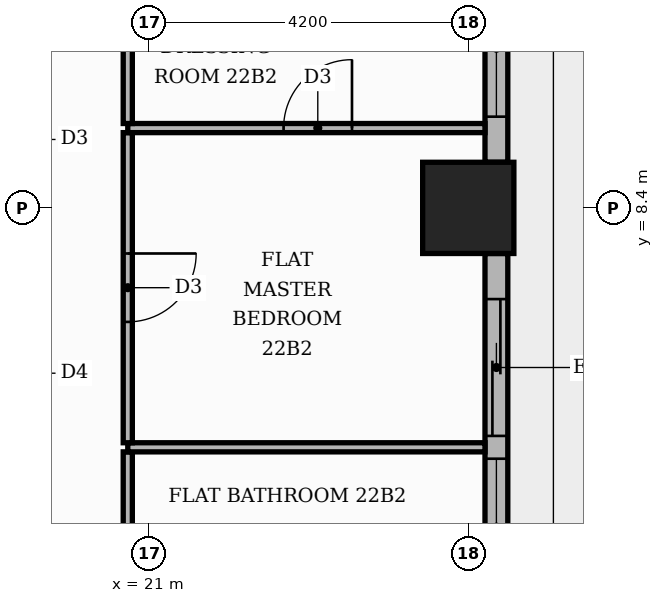
"""IFC4 building model, lengths in metres.
Left out: names, types, materials, properties, quantities, classifications, styles, units other than length and angle.
Written with IfcOpenShell. Run it as: python <this file> out.ifc"""

import sys

from ifc_helpers import new_model, si_unit, direction, frame, frame_2d, origin, origin_2d, place, context, subcontext, project, spatial, rectangle, extrude, element, fill, save


model = new_model("IFC4")
c1 = context("Model", 3, precision=1e-05, world=origin(), true_north=direction((0.0, 1.0)))
c2 = subcontext(c1, "Body", "Model", "MODEL_VIEW")
j1 = project(units=[si_unit("LENGTHUNIT", "METRE"), si_unit("PLANEANGLEUNIT", "RADIAN")], contexts=[c1])
p1 = place(None, origin())
s1 = spatial("IfcSite", under=j1, at=p1, CompositionType="ELEMENT")
p2 = place(p1, origin())
s2 = spatial("IfcBuilding", under=s1, at=p2, CompositionType="ELEMENT")
p3 = place(p2, frame((0.0, 0.0, 94.8)))
s3 = spatial("IfcBuildingStorey", under=s2, at=p3, CompositionType="ELEMENT", Elevation=94.8)
p4 = place(p3, frame((25.2, 8.4, 0.0), z_axis=(0.0, 0.0, 1.0), x_axis=(1.0, 0.0, 0.0)))
e1 = element("IfcColumn", 1, at=p4, inside=s3, PredefinedType="COLUMN", context=c2, shape_type="SweptSolid", body=[
    extrude(rectangle(XDim=1.2, YDim=1.2, at=origin_2d()), origin(), (0.0, 0.0, 1.0), 3.9),
])
p5 = place(p3, frame((25.57, 0.6, 0.0), z_axis=(0.0, 0.0, 1.0), x_axis=(0.0, 1.0, 0.0)))
e2 = element("IfcWall", 2, at=p5, inside=s3, PredefinedType="STANDARD", context=c2, shape_type="SweptSolid", body=[
    extrude(rectangle(XDim=7.2, YDim=0.3, at=frame_2d((3.6, 0.0))), origin(), (0.0, 0.0, 1.0), 3.48),
])
p6 = place(p5, frame((0.6, 0.0, 0.9)))
e3 = element("IfcOpeningElement", 3, at=p6, cuts=e2, PredefinedType="OPENING", context=c2, shape_type="SweptSolid", body=[
    extrude(rectangle(XDim=1.8, YDim=2.1, at=frame_2d((0.9, 1.05))), frame((0.0, 0.16, 0.0), z_axis=(0.0, -1.0, 0.0), x_axis=(1.0, 0.0, 0.0)), (0.0, 0.0, 1.0), 0.32),
])
p7 = place(p5, frame((2.7, 0.0, 0.9)))
e4 = element("IfcOpeningElement", 4, at=p7, cuts=e2, PredefinedType="OPENING", context=c2, shape_type="SweptSolid", body=[
    extrude(rectangle(XDim=1.8, YDim=2.1, at=frame_2d((0.9, 1.05))), frame((0.0, 0.16, 0.0), z_axis=(0.0, -1.0, 0.0), x_axis=(1.0, 0.0, 0.0)), (0.0, 0.0, 1.0), 0.32),
])
p8 = place(p5, frame((4.8, 0.0, 0.0)))
e5 = element("IfcOpeningElement", 5, at=p8, cuts=e2, PredefinedType="OPENING", context=c2, shape_type="SweptSolid", body=[
    extrude(rectangle(XDim=1.8, YDim=2.4, at=frame_2d((0.9, 1.2))), frame((0.0, 0.16, 0.0), z_axis=(0.0, -1.0, 0.0), x_axis=(1.0, 0.0, 0.0)), (0.0, 0.0, 1.0), 0.32),
])
p9 = place(p3, frame((25.57, 9.0, 0.0), z_axis=(0.0, 0.0, 1.0), x_axis=(0.0, 1.0, 0.0)))
e6 = element("IfcWall", 6, at=p9, inside=s3, PredefinedType="STANDARD", context=c2, shape_type="SweptSolid", body=[
    extrude(rectangle(XDim=7.2, YDim=0.3, at=frame_2d((3.6, 0.0))), origin(), (0.0, 0.0, 1.0), 3.48),
])
p10 = place(p9, frame((0.6, 0.0, 0.9)))
e7 = element("IfcOpeningElement", 7, at=p10, cuts=e6, PredefinedType="OPENING", context=c2, shape_type="SweptSolid", body=[
    extrude(rectangle(XDim=1.8, YDim=2.1, at=frame_2d((0.9, 1.05))), frame((0.0, 0.16, 0.0), z_axis=(0.0, -1.0, 0.0), x_axis=(1.0, 0.0, 0.0)), (0.0, 0.0, 1.0), 0.32),
])
p11 = place(p9, frame((2.7, 0.0, 0.9)))
e8 = element("IfcOpeningElement", 8, at=p11, cuts=e6, PredefinedType="OPENING", context=c2, shape_type="SweptSolid", body=[
    extrude(rectangle(XDim=1.8, YDim=2.1, at=frame_2d((0.9, 1.05))), frame((0.0, 0.16, 0.0), z_axis=(0.0, -1.0, 0.0), x_axis=(1.0, 0.0, 0.0)), (0.0, 0.0, 1.0), 0.32),
])
p12 = place(p9, frame((4.8, 0.0, 0.9)))
e9 = element("IfcOpeningElement", 9, at=p12, cuts=e6, PredefinedType="OPENING", context=c2, shape_type="SweptSolid", body=[
    extrude(rectangle(XDim=1.8, YDim=2.1, at=frame_2d((0.9, 1.05))), frame((0.0, 0.16, 0.0), z_axis=(0.0, -1.0, 0.0), x_axis=(1.0, 0.0, 0.0)), (0.0, 0.0, 1.0), 0.32),
])
p13 = place(p3, frame((20.72, 3.21, 0.0), z_axis=(0.0, 0.0, 1.0), x_axis=(0.0, 1.0, 0.0)))
e10 = element("IfcWall", 10, at=p13, inside=s3, PredefinedType="PARTITIONING", context=c2, shape_type="SweptSolid", body=[
    extrude(rectangle(XDim=1.98, YDim=0.12, at=frame_2d((0.99, 0.0))), origin(), (0.0, 0.0, 1.0), 3.48),
])
p14 = place(p3, frame((20.72, 5.25, 0.0), z_axis=(0.0, 0.0, 1.0), x_axis=(1.0, 0.0, 0.0)))
e11 = element("IfcWall", 11, at=p14, inside=s3, PredefinedType="PARTITIONING", context=c2, shape_type="SweptSolid", body=[
    extrude(rectangle(XDim=4.7, YDim=0.12, at=frame_2d((2.35, 0.0))), origin(), (0.0, 0.0, 1.0), 3.48),
])
p15 = place(p3, frame((20.72, 5.31, 0.0), z_axis=(0.0, 0.0, 1.0), x_axis=(0.0, 1.0, 0.0)))
e12 = element("IfcWall", 12, at=p15, inside=s3, PredefinedType="PARTITIONING", context=c2, shape_type="SweptSolid", body=[
    extrude(rectangle(XDim=4.08, YDim=0.12, at=frame_2d((2.04, 0.0))), origin(), (0.0, 0.0, 1.0), 3.48),
])
p16 = place(p15, frame((1.59, 0.0, 0.0)))
e13 = element("IfcOpeningElement", 13, at=p16, cuts=e12, PredefinedType="OPENING", context=c2, shape_type="SweptSolid", body=[
    extrude(rectangle(XDim=0.9, YDim=2.1, at=frame_2d((0.45, 1.05))), frame((0.0, 0.07, 0.0), z_axis=(0.0, -1.0, 0.0), x_axis=(1.0, 0.0, 0.0)), (0.0, 0.0, 1.0), 0.14),
])
p17 = place(p3, frame((20.72, 9.45, 0.0), z_axis=(0.0, 0.0, 1.0), x_axis=(1.0, 0.0, 0.0)))
e14 = element("IfcWall", 14, at=p17, inside=s3, PredefinedType="PARTITIONING", context=c2, shape_type="SweptSolid", body=[
    extrude(rectangle(XDim=4.7, YDim=0.12, at=frame_2d((2.35, 0.0))), origin(), (0.0, 0.0, 1.0), 3.48),
])
p18 = place(p17, frame((2.05, 0.0, 0.0)))
e15 = element("IfcOpeningElement", 15, at=p18, cuts=e14, PredefinedType="OPENING", context=c2, shape_type="SweptSolid", body=[
    extrude(rectangle(XDim=0.9, YDim=2.1, at=frame_2d((0.45, 1.05))), frame((0.0, 0.07, 0.0), z_axis=(0.0, -1.0, 0.0), x_axis=(1.0, 0.0, 0.0)), (0.0, 0.0, 1.0), 0.14),
])
p19 = place(p3, frame((20.72, 9.51, 0.0), z_axis=(0.0, 0.0, 1.0), x_axis=(0.0, 1.0, 0.0)))
e16 = element("IfcWall", 16, at=p19, inside=s3, PredefinedType="PARTITIONING", context=c2, shape_type="SweptSolid", body=[
    extrude(rectangle(XDim=1.98, YDim=0.12, at=frame_2d((0.99, 0.0))), origin(), (0.0, 0.0, 1.0), 3.48),
])
p20 = place(p7, origin())
e17 = element("IfcWindow", 17, at=p20, inside=s3, PartitioningType="SINGLE_PANEL", PredefinedType="WINDOW", context=c2, shape_type="SweptSolid", body=[
    extrude(rectangle(XDim=1.8, YDim=2.1, at=frame_2d((0.9, 1.05))), frame((0.0, 0.03, 0.0), z_axis=(0.0, -1.0, 0.0), x_axis=(1.0, 0.0, 0.0)), (0.0, 0.0, 1.0), 0.06),
])
fill(e4, e17)
p21 = place(p8, origin())
e18 = element("IfcDoor", 18, at=p21, inside=s3, OperationType="SLIDING_TO_RIGHT", PredefinedType="DOOR", context=c2, shape_type="SweptSolid", body=[
    extrude(rectangle(XDim=1.8, YDim=2.4, at=frame_2d((0.9, 1.2))), frame((0.0, 0.025, 0.0), z_axis=(0.0, -1.0, 0.0), x_axis=(1.0, 0.0, 0.0)), (0.0, 0.0, 1.0), 0.05),
])
fill(e5, e18)
p22 = place(p10, origin())
e19 = element("IfcWindow", 19, at=p22, inside=s3, PartitioningType="SINGLE_PANEL", PredefinedType="WINDOW", context=c2, shape_type="SweptSolid", body=[
    extrude(rectangle(XDim=1.8, YDim=2.1, at=frame_2d((0.9, 1.05))), frame((0.0, 0.03, 0.0), z_axis=(0.0, -1.0, 0.0), x_axis=(1.0, 0.0, 0.0)), (0.0, 0.0, 1.0), 0.06),
])
fill(e7, e19)
p23 = place(p16, frame((0.9, 0.0, 0.0), z_axis=(0.0, 0.0, 1.0), x_axis=(-1.0, 0.0, 0.0)))
e20 = element("IfcDoor", 20, at=p23, inside=s3, OperationType="SINGLE_SWING_RIGHT", PredefinedType="DOOR", context=c2, shape_type="SweptSolid", body=[
    extrude(rectangle(XDim=0.9, YDim=2.1, at=frame_2d((0.45, 1.05))), frame((0.0, 0.025, 0.0), z_axis=(0.0, -1.0, 0.0), x_axis=(1.0, 0.0, 0.0)), (0.0, 0.0, 1.0), 0.05),
])
fill(e13, e20)
p24 = place(p18, origin())
e21 = element("IfcDoor", 21, at=p24, inside=s3, OperationType="SINGLE_SWING_RIGHT", PredefinedType="DOOR", context=c2, shape_type="SweptSolid", body=[
    extrude(rectangle(XDim=0.9, YDim=2.1, at=frame_2d((0.45, 1.05))), frame((0.0, 0.025, 0.0), z_axis=(0.0, -1.0, 0.0), x_axis=(1.0, 0.0, 0.0)), (0.0, 0.0, 1.0), 0.05),
])
fill(e15, e21)
save(model, sys.argv[1])
